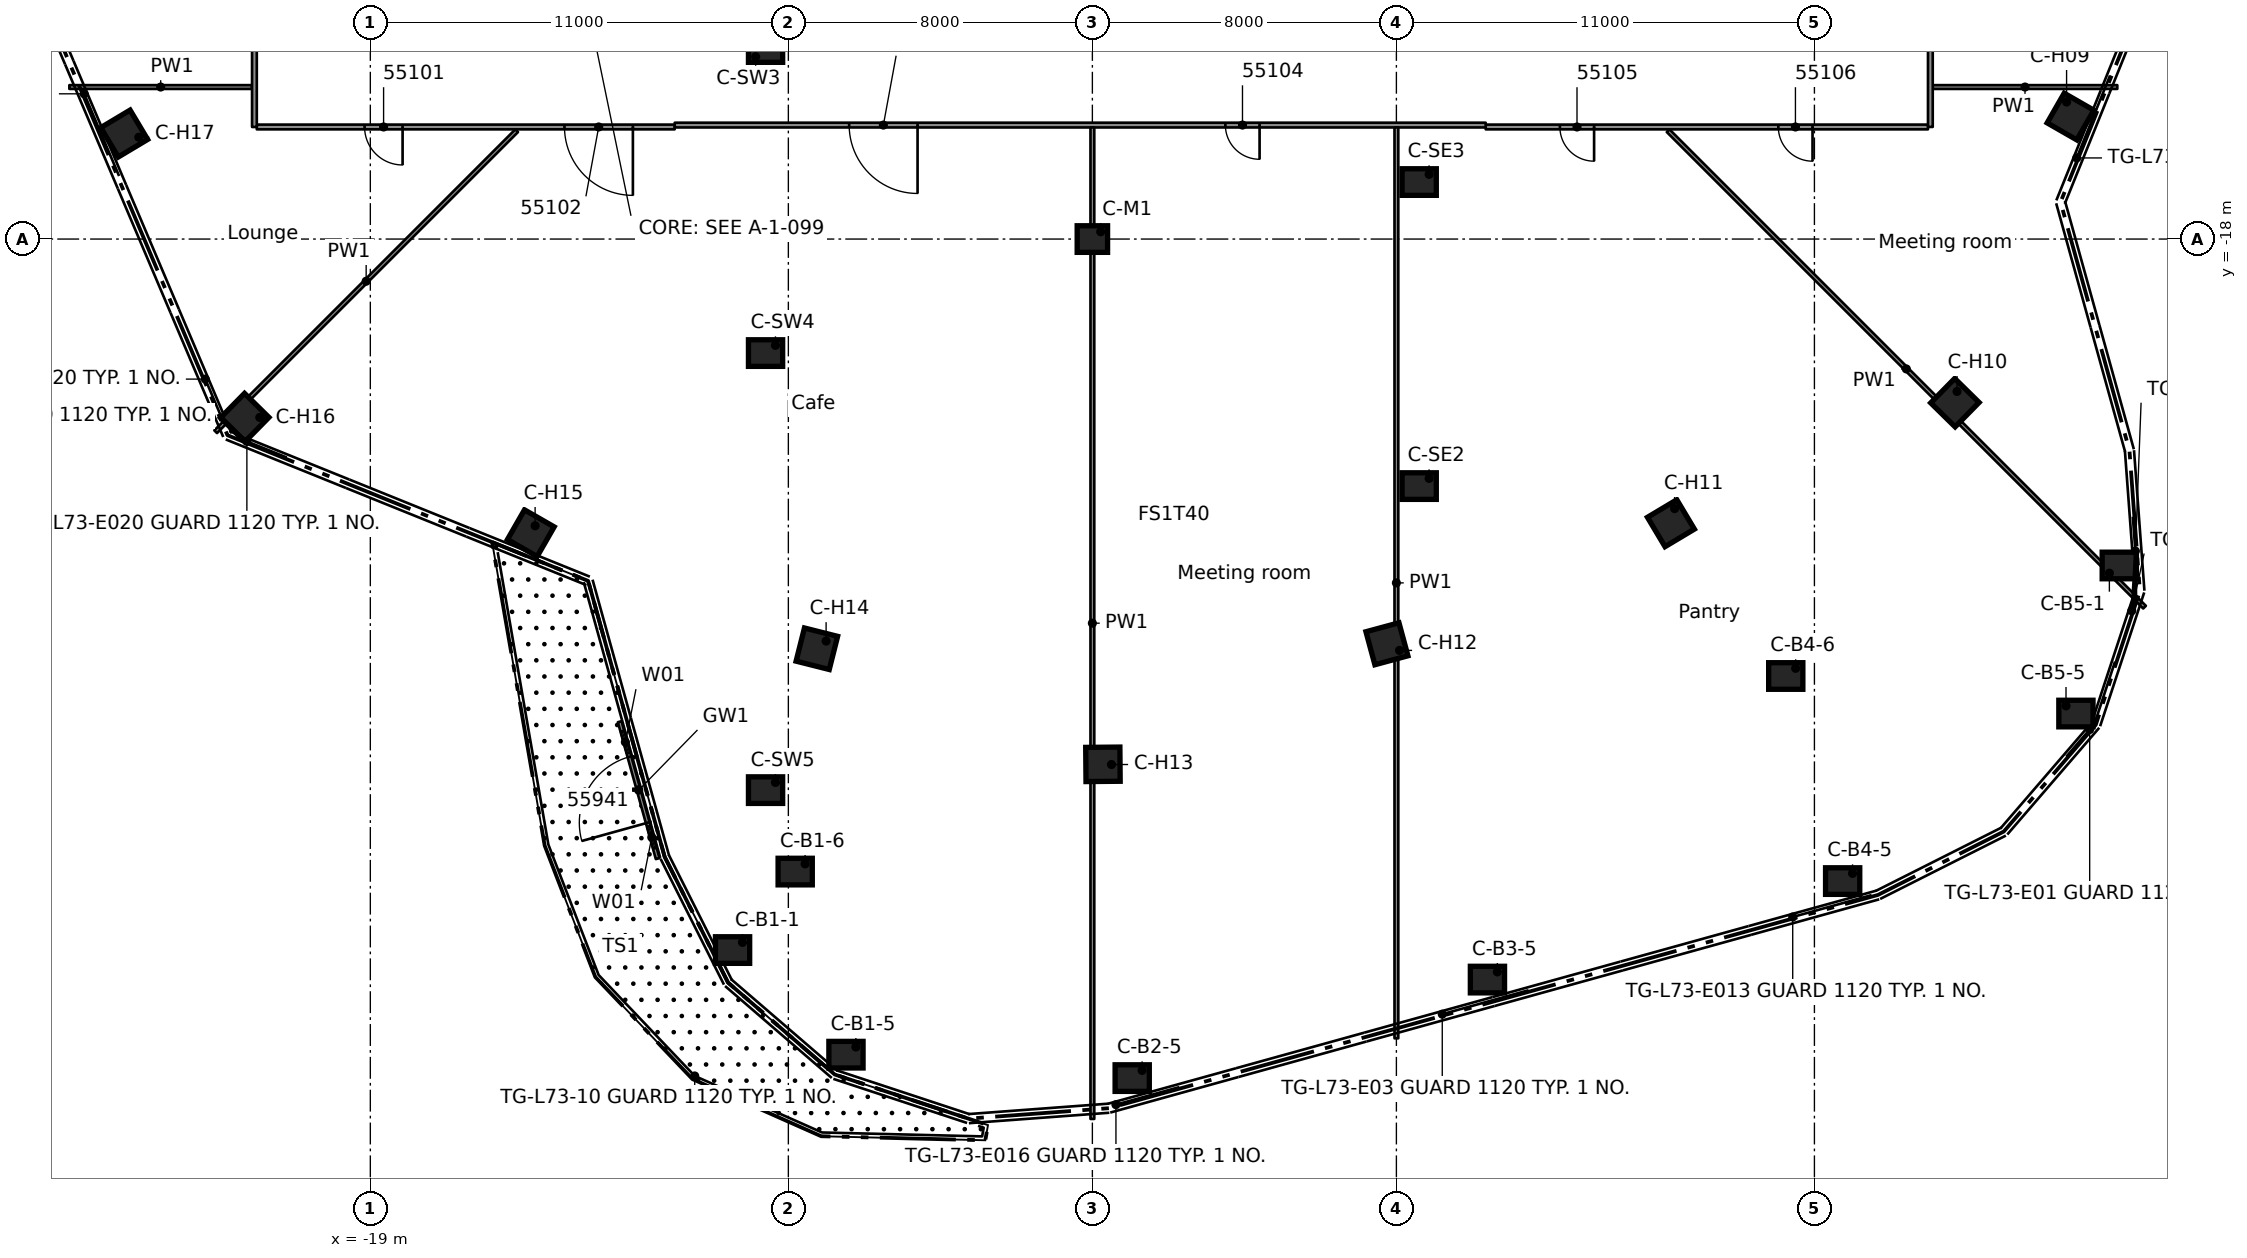
"""IFC4 building model, lengths in metres.
Left out: names, types, materials, properties, quantities, classifications, styles, units other than length and angle.
Written with IfcOpenShell. Run it as: python <this file> out.ifc"""

import sys

from ifc_helpers import new_model, si_unit, direction, frame, frame_2d, origin, origin_2d, place, context, subcontext, project, spatial, rectangle, extrude, element, fill, save


model = new_model("IFC4")
c1 = context("Model", 3, precision=1e-05, world=origin(), true_north=direction((0.0, 1.0)))
c2 = subcontext(c1, "Body", "Model", "MODEL_VIEW")
j1 = project(units=[si_unit("LENGTHUNIT", "METRE"), si_unit("PLANEANGLEUNIT", "RADIAN")], contexts=[c1])
p1 = place(None, origin())
s1 = spatial("IfcSite", under=j1, at=p1, CompositionType="ELEMENT")
p2 = place(p1, origin())
s2 = spatial("IfcBuilding", under=s1, at=p2, CompositionType="ELEMENT")
p3 = place(p2, frame((0.0, 0.0, 275.4)))
s3 = spatial("IfcBuildingStorey", under=s2, at=p3, CompositionType="ELEMENT", Elevation=275.4)
for number, where, z_axis, x_axis in (
    (1, (-9.468, -36.708, 0.0), (0.0, 0.0, 1.0), (1.0, 0.0, 0.0)),
    (2, (-6.484, -39.461, 0.0), (0.0, 0.0, 1.0), (1.0, 0.0, 0.0)),
    (3, (-7.82, -34.643, 0.0), (0.0, 0.0, 1.0), (1.0, 0.0, 0.0)),
    (4, (1.048, -40.077, 0.0), (0.0, 0.0, 1.0), (1.0, 0.0, 0.0)),
    (5, (10.396, -37.485, 0.0), (0.0, 0.0, 1.0), (1.0, 0.0, 0.0)),
    (6, (19.743, -34.893, 0.0), (0.0, 0.0, 1.0), (1.0, 0.0, 0.0)),
    (7, (18.246, -29.497, 0.0), (0.0, 0.0, 1.0), (1.0, 0.0, 0.0)),
    (8, (27.022, -26.589, 0.0), (0.0, 0.0, 1.0), (1.0, 0.0, 0.0)),
    (9, (25.881, -30.485, 0.0), (0.0, 0.0, 1.0), (1.0, 0.0, 0.0)),
):
    element("IfcColumn", number, at=place(p3, frame(where, z_axis=z_axis, x_axis=x_axis)), inside=s3, PredefinedType="COLUMN", context=c2, shape_type="SweptSolid", body=[
        extrude(rectangle(XDim=0.9, YDim=0.7, at=origin_2d()), origin(), (0.0, 0.0, 1.0), 3.5),
    ])
for number, where, z_axis, x_axis in (
    (10, (25.739, -14.777, 0.0), (0.0, 0.0, 1.0), (0.867, -0.498, 0.0)),
    (11, (22.697, -22.305, 0.0), (0.0, 0.0, 1.0), (0.713, -0.701, 0.0)),
    (12, (15.224, -25.477, 0.0), (0.0, 0.0, 1.0), (0.513, -0.858, 0.0)),
    (13, (7.751, -28.649, 0.0), (0.0, 0.0, 1.0), (0.261, -0.965, 0.0)),
    (14, (0.278, -31.821, 0.0), (0.0, 0.0, 1.0), (0.009, -1.0, 0.0)),
    (15, (-7.25, -28.78, 0.0), (0.0, 0.0, 1.0), (-0.244, -0.97, 0.0)),
    (16, (-14.777, -25.739, 0.0), (0.0, 0.0, 1.0), (-0.498, -0.867, 0.0)),
    (17, (-22.305, -22.697, 0.0), (0.0, 0.0, 1.0), (-0.701, -0.713, 0.0)),
    (18, (-25.477, -15.224, 0.0), (0.0, 0.0, 1.0), (-0.858, -0.513, 0.0)),
):
    element("IfcColumn", number, at=place(p3, frame(where, z_axis=z_axis, x_axis=x_axis)), inside=s3, PredefinedType="COLUMN", context=c2, shape_type="SweptSolid", body=[
        extrude(rectangle(XDim=0.9, YDim=0.9, at=origin_2d()), origin(), (0.0, 0.0, 1.0), 3.5),
    ])
p4 = place(p3, frame((0.0, -18.0, 0.0), z_axis=(0.0, 0.0, 1.0), x_axis=(1.0, 0.0, 0.0)))
e19 = element("IfcColumn", 19, at=p4, inside=s3, PredefinedType="COLUMN", context=c2, shape_type="SweptSolid", body=[
    extrude(rectangle(XDim=0.8, YDim=0.7, at=origin_2d()), origin(), (0.0, 0.0, 1.0), 3.5),
])
for number, where, z_axis, x_axis in (
    (20, (8.6, -24.5, 0.0), (0.0, 0.0, 1.0), (1.0, 0.0, 0.0)),
    (21, (8.6, -16.5, 0.0), (0.0, 0.0, 1.0), (1.0, 0.0, 0.0)),
    (22, (-8.6, -13.0, 0.0), (0.0, 0.0, 1.0), (1.0, 0.0, 0.0)),
    (23, (-8.6, -21.0, 0.0), (0.0, 0.0, 1.0), (1.0, 0.0, 0.0)),
    (24, (-8.6, -32.5, 0.0), (0.0, 0.0, 1.0), (1.0, 0.0, 0.0)),
):
    element("IfcColumn", number, at=place(p3, frame(where, z_axis=z_axis, x_axis=x_axis)), inside=s3, PredefinedType="COLUMN", context=c2, shape_type="SweptSolid", body=[
        extrude(rectangle(XDim=0.9, YDim=0.7, at=origin_2d()), origin(), (0.0, 0.0, 1.0), 3.5),
    ])
p5 = place(p3, frame((-11.439, -34.302, 0.0), z_axis=(0.0, 0.0, 1.0), x_axis=(-0.26725982594, 0.963624504378, 0.0)))
e25 = element("IfcWall", 25, at=p5, inside=s3, PredefinedType="STANDARD", context=c2, shape_type="SweptSolid", body=[
    extrude(rectangle(XDim=3.738, YDim=0.1, at=frame_2d((1.869, 0.0))), origin(), (0.0, 0.0, 1.0), 3.1),
])
p6 = place(p5, frame((0.98, 0.0, 0.0)))
e26 = element("IfcOpeningElement", 26, at=p6, cuts=e25, PredefinedType="OPENING", context=c2, shape_type="SweptSolid", body=[
    extrude(rectangle(XDim=1.8, YDim=2.4, at=frame_2d((0.9, 1.2))), frame((0.0, 0.06, 0.0), z_axis=(0.0, -1.0, 0.0), x_axis=(1.0, 0.0, 0.0)), (0.0, 0.0, 1.0), 0.12),
])
p7 = place(p5, frame((0.281, 0.0, 0.0)))
e27 = element("IfcOpeningElement", 27, at=p7, cuts=e25, PredefinedType="OPENING", context=c2, shape_type="SweptSolid", body=[
    extrude(rectangle(XDim=0.6, YDim=2.4, at=frame_2d((0.3, 1.2))), frame((0.0, 0.06, 0.0), z_axis=(0.0, -1.0, 0.0), x_axis=(1.0, 0.0, 0.0)), (0.0, 0.0, 1.0), 0.12),
])
p8 = place(p5, frame((2.88, 0.0, 0.0)))
e28 = element("IfcOpeningElement", 28, at=p8, cuts=e25, PredefinedType="OPENING", context=c2, shape_type="SweptSolid", body=[
    extrude(rectangle(XDim=0.6, YDim=2.4, at=frame_2d((0.3, 1.2))), frame((0.0, 0.06, 0.0), z_axis=(0.0, -1.0, 0.0), x_axis=(1.0, 0.0, 0.0)), (0.0, 0.0, 1.0), 0.12),
])
p9 = place(p3, frame((15.15, -15.149, 0.0), z_axis=(0.0, 0.0, 1.0), x_axis=(0.707106781187, -0.707106781187, 0.0)))
e29 = element("IfcWall", 29, at=p9, inside=s3, PredefinedType="PARTITIONING", context=c2, shape_type="SweptSolid", body=[
    extrude(rectangle(XDim=17.73, YDim=0.1, at=frame_2d((8.865, 0.0))), origin(), (0.0, 0.0, 1.0), 3.08),
])
p10 = place(p3, frame((-10.991, -15.051, 0.0), z_axis=(0.0, 0.0, 1.0), x_axis=(-1.0, 0.0, 0.0)))
e30 = element("IfcWall", 30, at=p10, inside=s3, PredefinedType="PARTITIONING", context=c2, shape_type="SweptSolid", body=[
    extrude(rectangle(XDim=10.997, YDim=0.125, at=frame_2d((5.499, 0.0))), origin(), (0.0, 0.0, 1.0), 3.08),
])
p11 = place(p10, frame((7.16, 0.0, 0.0)))
e31 = element("IfcOpeningElement", 31, at=p11, cuts=e30, PredefinedType="OPENING", context=c2, shape_type="SweptSolid", body=[
    extrude(rectangle(XDim=1.0, YDim=2.1, at=frame_2d((0.5, 1.05))), frame((0.0, 0.073, 0.0), z_axis=(0.0, -1.0, 0.0), x_axis=(1.0, 0.0, 0.0)), (0.0, 0.0, 1.0), 0.145),
])
p12 = place(p10, frame((1.1, 0.0, 0.0)))
e32 = element("IfcOpeningElement", 32, at=p12, cuts=e30, PredefinedType="OPENING", context=c2, shape_type="SweptSolid", body=[
    extrude(rectangle(XDim=1.8, YDim=2.1, at=frame_2d((0.9, 1.05))), frame((0.0, 0.073, 0.0), z_axis=(0.0, -1.0, 0.0), x_axis=(1.0, 0.0, 0.0)), (0.0, 0.0, 1.0), 0.145),
])
p13 = place(p3, frame((21.988, -15.051, 0.0), z_axis=(0.0, 0.0, 1.0), x_axis=(-1.0, 0.0, 0.0)))
e33 = element("IfcWall", 33, at=p13, inside=s3, PredefinedType="PARTITIONING", context=c2, shape_type="SweptSolid", body=[
    extrude(rectangle(XDim=11.638, YDim=0.125, at=frame_2d((5.819, 0.0))), origin(), (0.0, 0.0, 1.0), 3.08),
])
p14 = place(p13, frame((8.785, 0.0, 0.0)))
e34 = element("IfcOpeningElement", 34, at=p14, cuts=e33, PredefinedType="OPENING", context=c2, shape_type="SweptSolid", body=[
    extrude(rectangle(XDim=0.9, YDim=2.1, at=frame_2d((0.45, 1.05))), frame((0.0, 0.073, 0.0), z_axis=(0.0, -1.0, 0.0), x_axis=(1.0, 0.0, 0.0)), (0.0, 0.0, 1.0), 0.145),
])
p15 = place(p13, frame((3.038, 0.0, 0.0)))
e35 = element("IfcOpeningElement", 35, at=p15, cuts=e33, PredefinedType="OPENING", context=c2, shape_type="SweptSolid", body=[
    extrude(rectangle(XDim=0.9, YDim=2.1, at=frame_2d((0.45, 1.05))), frame((0.0, 0.073, 0.0), z_axis=(0.0, -1.0, 0.0), x_axis=(1.0, 0.0, 0.0)), (0.0, 0.0, 1.0), 0.145),
])
p16 = place(p3, frame((10.349, -15.001, 0.0), z_axis=(0.0, 0.0, 1.0), x_axis=(-1.0, 0.0, 0.0)))
e36 = element("IfcWall", 36, at=p16, inside=s3, PredefinedType="PARTITIONING", context=c2, shape_type="SweptSolid", body=[
    extrude(rectangle(XDim=21.339, YDim=0.125, at=frame_2d((10.669, 0.0))), origin(), (0.0, 0.0, 1.0), 3.08),
])
p17 = place(p16, frame((14.949, 0.0, 0.0)))
e37 = element("IfcOpeningElement", 37, at=p17, cuts=e36, PredefinedType="OPENING", context=c2, shape_type="SweptSolid", body=[
    extrude(rectangle(XDim=1.8, YDim=2.1, at=frame_2d((0.9, 1.05))), frame((0.0, 0.073, 0.0), z_axis=(0.0, -1.0, 0.0), x_axis=(1.0, 0.0, 0.0)), (0.0, 0.0, 1.0), 0.145),
])
p18 = place(p16, frame((5.949, 0.0, 0.0)))
e38 = element("IfcOpeningElement", 38, at=p18, cuts=e36, PredefinedType="OPENING", context=c2, shape_type="SweptSolid", body=[
    extrude(rectangle(XDim=0.9, YDim=2.1, at=frame_2d((0.45, 1.05))), frame((0.0, 0.073, 0.0), z_axis=(0.0, -1.0, 0.0), x_axis=(1.0, 0.0, 0.0)), (0.0, 0.0, 1.0), 0.145),
])
p19 = place(p3, frame((-26.92, -14.0, 0.0), z_axis=(0.0, 0.0, 1.0), x_axis=(1.0, 0.0, 0.0)))
e39 = element("IfcWall", 39, at=p19, inside=s3, PredefinedType="PARTITIONING", context=c2, shape_type="SweptSolid", body=[
    extrude(rectangle(XDim=4.807, YDim=0.1, at=frame_2d((2.403, 0.0))), origin(), (0.0, 0.0, 1.0), 3.08),
])
p20 = place(p3, frame((22.113, -14.0, 0.0), z_axis=(0.0, 0.0, 1.0), x_axis=(1.0, 0.0, 0.0)))
e40 = element("IfcWall", 40, at=p20, inside=s3, PredefinedType="PARTITIONING", context=c2, shape_type="SweptSolid", body=[
    extrude(rectangle(XDim=4.857, YDim=0.1, at=frame_2d((2.428, 0.0))), origin(), (0.0, 0.0, 1.0), 3.08),
])
p21 = place(p3, frame((-23.07, -23.07, 0.0), z_axis=(0.0, 0.0, 1.0), x_axis=(0.707106781187, 0.707106781187, 0.0)))
e41 = element("IfcWall", 41, at=p21, inside=s3, PredefinedType="PARTITIONING", context=c2, shape_type="SweptSolid", body=[
    extrude(rectangle(XDim=11.202, YDim=0.1, at=frame_2d((5.601, 0.0))), origin(), (0.0, 0.0, 1.0), 3.08),
])
p22 = place(p3, frame((22.051, 15.05, 0.0), z_axis=(0.0, 0.0, 1.0), x_axis=(0.0, -1.0, 0.0)))
e42 = element("IfcWall", 42, at=p22, inside=s3, PredefinedType="PARTITIONING", context=c2, shape_type="SweptSolid", body=[
    extrude(rectangle(XDim=30.1, YDim=0.125, at=frame_2d((15.05, 0.0))), origin(), (0.0, 0.0, 1.0), 3.08),
])
p23 = place(p22, frame((21.65, 0.0, 0.0)))
e43 = element("IfcOpeningElement", 43, at=p23, cuts=e42, PredefinedType="OPENING", context=c2, shape_type="SweptSolid", body=[
    extrude(rectangle(XDim=0.9, YDim=2.1, at=frame_2d((0.45, 1.05))), frame((0.0, 0.073, 0.0), z_axis=(0.0, -1.0, 0.0), x_axis=(1.0, 0.0, 0.0)), (0.0, 0.0, 1.0), 0.145),
])
p24 = place(p22, frame((11.15, 0.0, 0.0)))
e44 = element("IfcOpeningElement", 44, at=p24, cuts=e42, PredefinedType="OPENING", context=c2, shape_type="SweptSolid", body=[
    extrude(rectangle(XDim=0.9, YDim=2.1, at=frame_2d((0.45, 1.05))), frame((0.0, 0.073, 0.0), z_axis=(0.0, -1.0, 0.0), x_axis=(1.0, 0.0, 0.0)), (0.0, 0.0, 1.0), 0.145),
])
p25 = place(p22, frame((3.65, 0.0, 0.0)))
e45 = element("IfcOpeningElement", 45, at=p25, cuts=e42, PredefinedType="OPENING", context=c2, shape_type="SweptSolid", body=[
    extrude(rectangle(XDim=1.8, YDim=2.1, at=frame_2d((0.9, 1.05))), frame((0.0, 0.073, 0.0), z_axis=(0.0, -1.0, 0.0), x_axis=(1.0, 0.0, 0.0)), (0.0, 0.0, 1.0), 0.145),
])
p26 = place(p3, frame((8.0, -39.031, 0.0), z_axis=(0.0, 0.0, 1.0), x_axis=(0.0, 1.0, 0.0)))
e46 = element("IfcWall", 46, at=p26, inside=s3, PredefinedType="PARTITIONING", context=c2, shape_type="SweptSolid", body=[
    extrude(rectangle(XDim=23.968, YDim=0.1, at=frame_2d((11.984, 0.0))), origin(), (0.0, 0.0, 1.0), 3.08),
])
p27 = place(p3, frame((0.0, -41.152, 0.0), z_axis=(0.0, 0.0, 1.0), x_axis=(0.0, 1.0, 0.0)))
e47 = element("IfcWall", 47, at=p27, inside=s3, PredefinedType="PARTITIONING", context=c2, shape_type="SweptSolid", body=[
    extrude(rectangle(XDim=26.089, YDim=0.1, at=frame_2d((13.044, 0.0))), origin(), (0.0, 0.0, 1.0), 3.08),
])
p28 = place(p3, frame((-22.05, -15.051, 0.0), z_axis=(0.0, 0.0, 1.0), x_axis=(0.0, 1.0, 0.0)))
e48 = element("IfcWall", 48, at=p28, inside=s3, PredefinedType="PARTITIONING", context=c2, shape_type="SweptSolid", body=[
    extrude(rectangle(XDim=30.102, YDim=0.125, at=frame_2d((15.051, 0.0))), origin(), (0.0, 0.0, 1.0), 3.08),
])
p29 = place(p28, frame((8.151, 0.0, 0.0)))
e49 = element("IfcOpeningElement", 49, at=p29, cuts=e48, PredefinedType="OPENING", context=c2, shape_type="SweptSolid", body=[
    extrude(rectangle(XDim=1.8, YDim=2.1, at=frame_2d((0.9, 1.05))), frame((0.0, 0.073, 0.0), z_axis=(0.0, -1.0, 0.0), x_axis=(1.0, 0.0, 0.0)), (0.0, 0.0, 1.0), 0.145),
])
p30 = place(p28, frame((25.652, 0.0, 0.0)))
e50 = element("IfcOpeningElement", 50, at=p30, cuts=e48, PredefinedType="OPENING", context=c2, shape_type="SweptSolid", body=[
    extrude(rectangle(XDim=0.9, YDim=2.1, at=frame_2d((0.45, 1.05))), frame((0.0, 0.073, 0.0), z_axis=(0.0, -1.0, 0.0), x_axis=(1.0, 0.0, 0.0)), (0.0, 0.0, 1.0), 0.145),
])
p31 = place(p28, frame((19.402, 0.0, 0.0)))
e51 = element("IfcOpeningElement", 51, at=p31, cuts=e48, PredefinedType="OPENING", context=c2, shape_type="SweptSolid", body=[
    extrude(rectangle(XDim=1.1, YDim=2.1, at=frame_2d((0.55, 1.05))), frame((0.0, 0.073, 0.0), z_axis=(0.0, -1.0, 0.0), x_axis=(1.0, 0.0, 0.0)), (0.0, 0.0, 1.0), 0.145),
])
p32 = place(p6, origin())
e52 = element("IfcDoor", 52, at=p32, inside=s3, OperationType="DOUBLE_DOOR_SINGLE_SWING", PredefinedType="DOOR", context=c2, shape_type="SweptSolid", body=[
    extrude(rectangle(XDim=1.8, YDim=2.4, at=frame_2d((0.9, 1.2))), frame((0.0, 0.025, 0.0), z_axis=(0.0, -1.0, 0.0), x_axis=(1.0, 0.0, 0.0)), (0.0, 0.0, 1.0), 0.05),
])
fill(e26, e52)
p33 = place(p7, origin())
e53 = element("IfcWindow", 53, at=p33, inside=s3, PartitioningType="SINGLE_PANEL", PredefinedType="WINDOW", context=c2, shape_type="SweptSolid", body=[
    extrude(rectangle(XDim=0.6, YDim=2.4, at=frame_2d((0.3, 1.2))), frame((0.0, 0.03, 0.0), z_axis=(0.0, -1.0, 0.0), x_axis=(1.0, 0.0, 0.0)), (0.0, 0.0, 1.0), 0.06),
])
fill(e27, e53)
p34 = place(p8, origin())
e54 = element("IfcWindow", 54, at=p34, inside=s3, PartitioningType="SINGLE_PANEL", PredefinedType="WINDOW", context=c2, shape_type="SweptSolid", body=[
    extrude(rectangle(XDim=0.6, YDim=2.4, at=frame_2d((0.3, 1.2))), frame((0.0, 0.03, 0.0), z_axis=(0.0, -1.0, 0.0), x_axis=(1.0, 0.0, 0.0)), (0.0, 0.0, 1.0), 0.06),
])
fill(e28, e54)
p35 = place(p11, origin())
e55 = element("IfcDoor", 55, at=p35, inside=s3, OperationType="SINGLE_SWING_RIGHT", PredefinedType="DOOR", context=c2, shape_type="SweptSolid", body=[
    extrude(rectangle(XDim=1.0, YDim=2.1, at=frame_2d((0.5, 1.05))), frame((0.0, 0.025, 0.0), z_axis=(0.0, -1.0, 0.0), x_axis=(1.0, 0.0, 0.0)), (0.0, 0.0, 1.0), 0.05),
])
fill(e31, e55)
p36 = place(p12, origin())
e56 = element("IfcDoor", 56, at=p36, inside=s3, OperationType="DOUBLE_DOOR_SINGLE_SWING", PredefinedType="DOOR", context=c2, shape_type="SweptSolid", body=[
    extrude(rectangle(XDim=1.8, YDim=2.1, at=frame_2d((0.9, 1.05))), frame((0.0, 0.025, 0.0), z_axis=(0.0, -1.0, 0.0), x_axis=(1.0, 0.0, 0.0)), (0.0, 0.0, 1.0), 0.05),
])
fill(e32, e56)
p37 = place(p17, origin())
e57 = element("IfcDoor", 57, at=p37, inside=s3, OperationType="DOUBLE_DOOR_SINGLE_SWING", PredefinedType="DOOR", context=c2, shape_type="SweptSolid", body=[
    extrude(rectangle(XDim=1.8, YDim=2.1, at=frame_2d((0.9, 1.05))), frame((0.0, 0.025, 0.0), z_axis=(0.0, -1.0, 0.0), x_axis=(1.0, 0.0, 0.0)), (0.0, 0.0, 1.0), 0.05),
])
fill(e37, e57)
p38 = place(p18, origin())
e58 = element("IfcDoor", 58, at=p38, inside=s3, OperationType="SINGLE_SWING_LEFT", PredefinedType="DOOR", context=c2, shape_type="SweptSolid", body=[
    extrude(rectangle(XDim=0.9, YDim=2.1, at=frame_2d((0.45, 1.05))), frame((0.0, 0.025, 0.0), z_axis=(0.0, -1.0, 0.0), x_axis=(1.0, 0.0, 0.0)), (0.0, 0.0, 1.0), 0.05),
])
fill(e38, e58)
p39 = place(p14, origin())
e59 = element("IfcDoor", 59, at=p39, inside=s3, OperationType="SINGLE_SWING_RIGHT", PredefinedType="DOOR", context=c2, shape_type="SweptSolid", body=[
    extrude(rectangle(XDim=0.9, YDim=2.1, at=frame_2d((0.45, 1.05))), frame((0.0, 0.025, 0.0), z_axis=(0.0, -1.0, 0.0), x_axis=(1.0, 0.0, 0.0)), (0.0, 0.0, 1.0), 0.05),
])
fill(e34, e59)
p40 = place(p15, origin())
e60 = element("IfcDoor", 60, at=p40, inside=s3, OperationType="SINGLE_SWING_LEFT", PredefinedType="DOOR", context=c2, shape_type="SweptSolid", body=[
    extrude(rectangle(XDim=0.9, YDim=2.1, at=frame_2d((0.45, 1.05))), frame((0.0, 0.025, 0.0), z_axis=(0.0, -1.0, 0.0), x_axis=(1.0, 0.0, 0.0)), (0.0, 0.0, 1.0), 0.05),
])
fill(e35, e60)
save(model, sys.argv[1])
